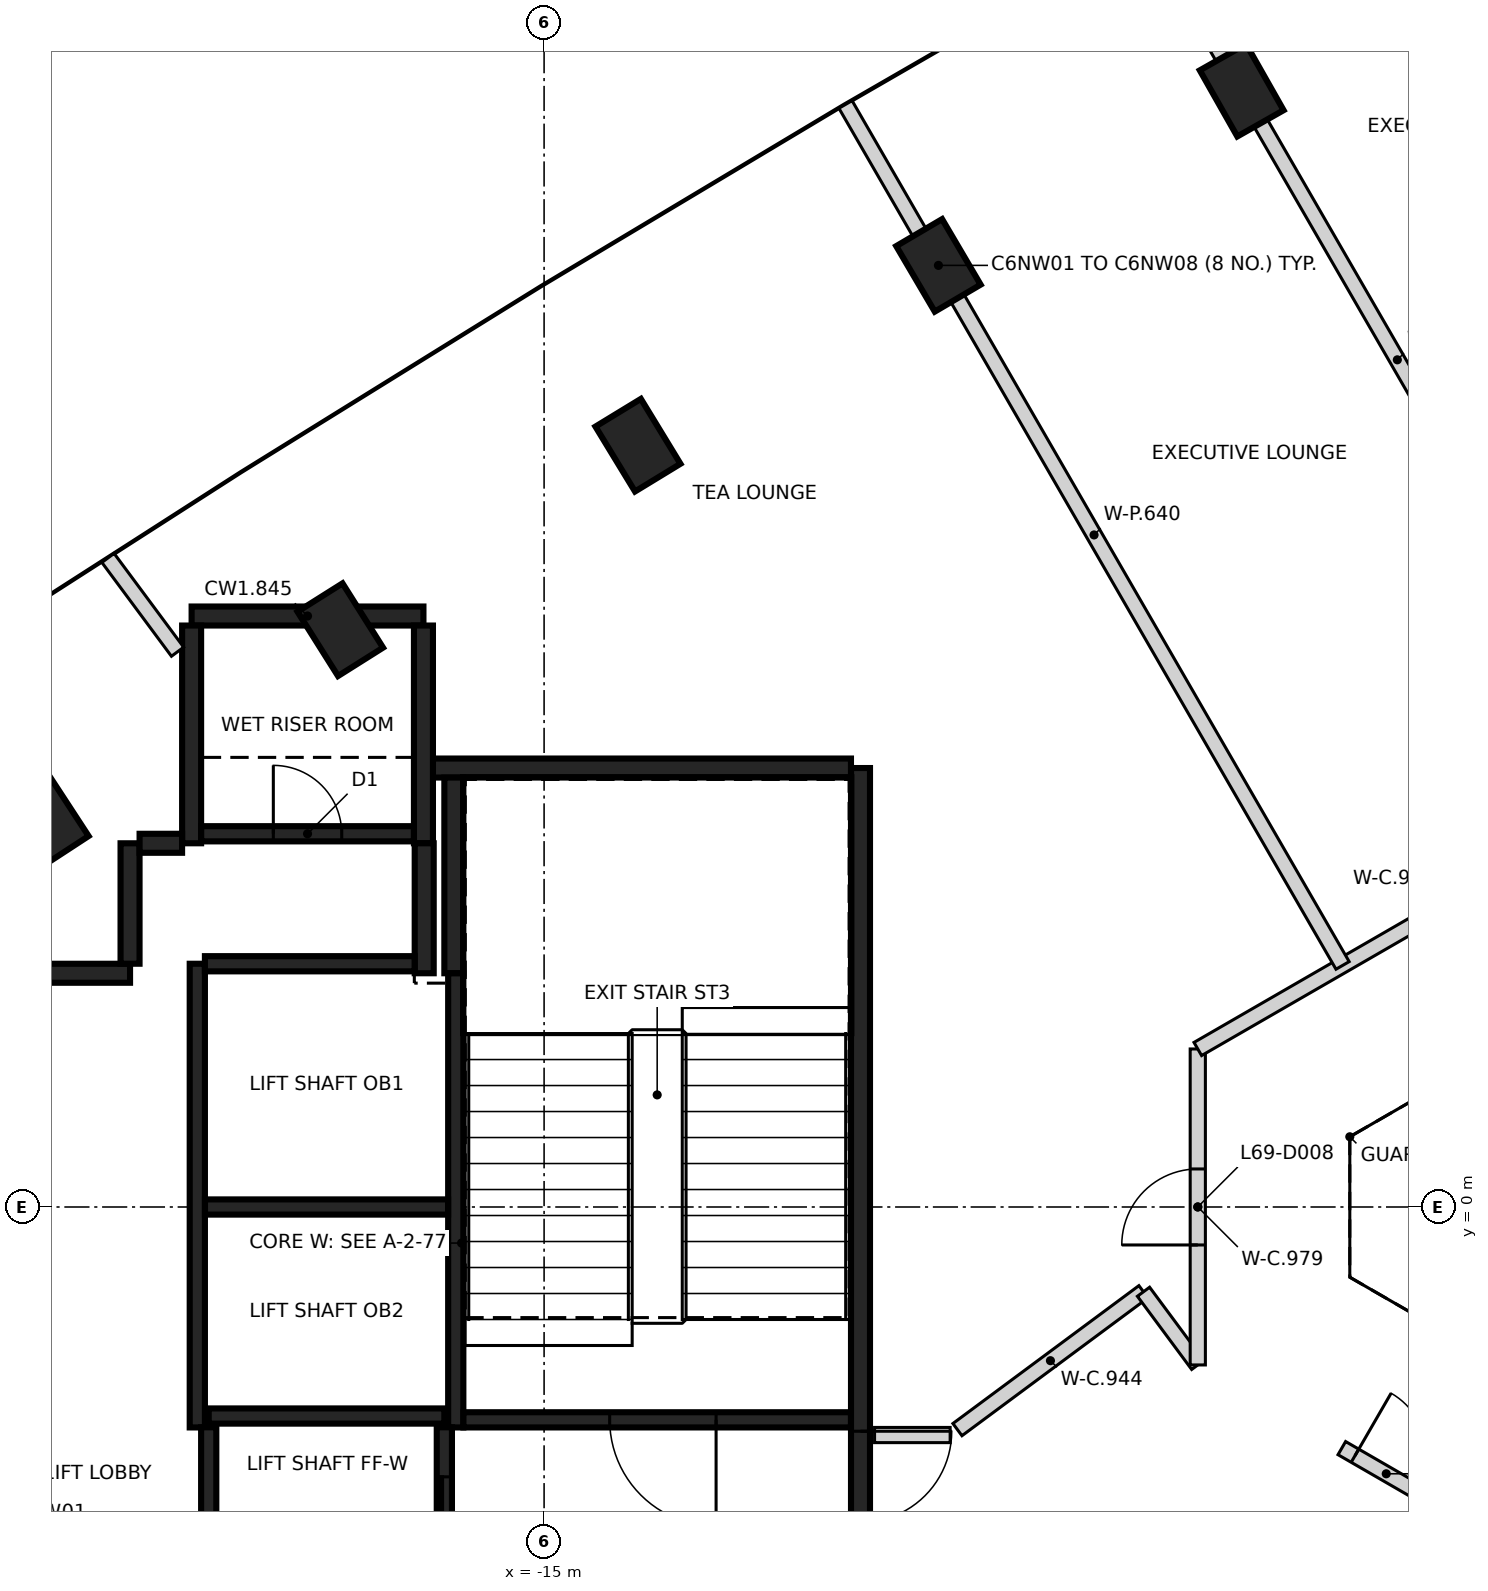
"""IFC4 building model, lengths in metres.
Left out: names, types, materials, properties, quantities, classifications, styles, units other than length and angle.
Written with IfcOpenShell. Run it as: python <this file> out.ifc"""

import sys

from ifc_helpers import new_model, si_unit, direction, frame, frame_2d, origin, origin_2d, place, context, subcontext, project, spatial, rectangle, extrude, element, fill, save


model = new_model("IFC4")
c1 = context("Model", 3, precision=1e-05, world=origin(), true_north=direction((0.0, 1.0)))
c2 = subcontext(c1, "Body", "Model", "MODEL_VIEW")
j1 = project(units=[si_unit("LENGTHUNIT", "METRE"), si_unit("PLANEANGLEUNIT", "RADIAN")], contexts=[c1])
p1 = place(None, origin())
s1 = spatial("IfcSite", under=j1, at=p1, CompositionType="ELEMENT")
p2 = place(p1, origin())
s2 = spatial("IfcBuilding", under=s1, at=p2, CompositionType="ELEMENT")
p3 = place(p2, frame((0.0, 0.0, 273.0)))
s3 = spatial("IfcBuildingStorey", under=s2, at=p3, CompositionType="ELEMENT", Elevation=273.0)
for number, where, z_axis, x_axis in (
    (1, (-5.822, 14.691, -0.35), (0.0, 0.0, 1.0), (-0.493, 0.87, 0.0)),
    (2, (-9.812, 12.388, -0.35), (0.0, 0.0, 1.0), (-0.507, 0.862, 0.0)),
    (3, (-13.765, 10.022, -0.35), (0.0, 0.0, 1.0), (-0.52, 0.854, 0.0)),
    (4, (-17.681, 7.595, -0.35), (0.0, 0.0, 1.0), (-0.533, 0.846, 0.0)),
    (5, (-21.559, 5.107, -0.35), (0.0, 0.0, 1.0), (-0.547, 0.837, 0.0)),
):
    element("IfcColumn", number, at=place(p3, frame(where, z_axis=z_axis, x_axis=x_axis)), inside=s3, PredefinedType="COLUMN", context=c2, shape_type="SweptSolid", body=[
        extrude(rectangle(XDim=1.0, YDim=0.7, at=origin_2d()), origin(), (0.0, 0.0, 1.0), 3.6),
    ])
p4 = place(p3, frame((-10.837, 5.775, 0.0), z_axis=(0.0, 0.0, 1.0), x_axis=(0.0, -1.0, 0.0)))
e6 = element("IfcWall", 6, at=p4, inside=s3, PredefinedType="SHEAR", context=c2, shape_type="SweptSolid", body=[
    extrude(rectangle(XDim=11.55, YDim=0.25, at=frame_2d((5.775, 0.0))), origin(), (0.0, 0.0, 1.0), 3.25),
])
p5 = place(p4, frame((10.025, 0.0, 0.0)))
e7 = element("IfcOpeningElement", 7, at=p5, cuts=e6, PredefinedType="OPENING", context=c2, shape_type="SweptSolid", body=[
    extrude(rectangle(XDim=1.2, YDim=2.1, at=frame_2d((0.6, 1.05))), frame((0.0, 0.135, 0.0), z_axis=(0.0, -1.0, 0.0), x_axis=(1.0, 0.0, 0.0)), (0.0, 0.0, 1.0), 0.27),
])
p6 = place(p4, frame((8.725, 0.0, 0.0)))
e8 = element("IfcOpeningElement", 8, at=p6, cuts=e6, PredefinedType="OPENING", context=c2, shape_type="SweptSolid", body=[
    extrude(rectangle(XDim=1.2, YDim=2.1, at=frame_2d((0.6, 1.05))), frame((0.0, 0.135, 0.0), z_axis=(0.0, -1.0, 0.0), x_axis=(1.0, 0.0, 0.0)), (0.0, 0.0, 1.0), 0.27),
])
p7 = place(p3, frame((-16.472, 5.775, 0.0), z_axis=(0.0, 0.0, 1.0), x_axis=(1.0, 0.0, 0.0)))
e9 = element("IfcWall", 9, at=p7, inside=s3, PredefinedType="SHEAR", context=c2, shape_type="SweptSolid", body=[
    extrude(rectangle(XDim=5.51, YDim=0.25, at=frame_2d((2.755, 0.0))), origin(), (0.0, 0.0, 1.0), 3.25),
])
p8 = place(p3, frame((-19.637, 7.775, 0.0), z_axis=(0.0, 0.0, 1.0), x_axis=(1.0, 0.0, 0.0)))
e10 = element("IfcWall", 10, at=p8, inside=s3, PredefinedType="SHEAR", context=c2, shape_type="SweptSolid", body=[
    extrude(rectangle(XDim=3.05, YDim=0.25, at=frame_2d((1.525, 0.0))), origin(), (0.0, 0.0, 1.0), 3.25),
])
for number, where, z_axis, x_axis in (
    (11, (-16.587, 7.65, 0.0), (0.0, 0.0, 1.0), (0.0, -1.0, 0.0)),
    (12, (-19.637, 4.785, 0.0), (0.0, 0.0, 1.0), (0.0, 1.0, 0.0)),
):
    element("IfcWall", number, at=place(p3, frame(where, z_axis=z_axis, x_axis=x_axis)), inside=s3, PredefinedType="SHEAR", context=c2, shape_type="SweptSolid", body=[
        extrude(rectangle(XDim=2.865, YDim=0.25, at=frame_2d((1.432, 0.0))), origin(), (0.0, 0.0, 1.0), 3.25),
    ])
p9 = place(p3, frame((-16.187, 3.075, 0.0), z_axis=(0.0, 0.0, 1.0), x_axis=(0.0, 1.0, 0.0)))
e13 = element("IfcWall", 13, at=p9, inside=s3, PredefinedType="SHEAR", context=c2, shape_type="SweptSolid", body=[
    extrude(rectangle(XDim=2.575, YDim=0.25, at=frame_2d((1.287, 0.0))), origin(), (0.0, 0.0, 1.0), 3.25),
])
p10 = place(p3, frame((-22.312, 3.075, 0.0), z_axis=(0.0, 0.0, 1.0), x_axis=(1.0, 0.0, 0.0)))
e14 = element("IfcWall", 14, at=p10, inside=s3, PredefinedType="SHEAR", context=c2, shape_type="SweptSolid", body=[
    extrude(rectangle(XDim=1.865, YDim=0.25, at=frame_2d((0.932, 0.0))), origin(), (0.0, 0.0, 1.0), 3.25),
])
p11 = place(p3, frame((-16.577, 4.785, 0.0), z_axis=(0.0, 0.0, 1.0), x_axis=(0.0, -1.0, 0.0)))
e15 = element("IfcWall", 15, at=p11, inside=s3, PredefinedType="SHEAR", context=c2, shape_type="SweptSolid", body=[
    extrude(rectangle(XDim=1.71, YDim=0.25, at=frame_2d((0.855, 0.0))), origin(), (0.0, 0.0, 1.0), 3.25),
])
p12 = place(p3, frame((-20.447, 3.2, 0.0), z_axis=(0.0, 0.0, 1.0), x_axis=(0.0, 1.0, 0.0)))
e16 = element("IfcWall", 16, at=p12, inside=s3, PredefinedType="SHEAR", context=c2, shape_type="SweptSolid", body=[
    extrude(rectangle(XDim=1.584, YDim=0.25, at=frame_2d((0.792, 0.0))), origin(), (0.0, 0.0, 1.0), 3.25),
])
p13 = place(p3, frame((-20.322, 4.785, 0.0), z_axis=(0.0, 0.0, 1.0), x_axis=(1.0, 0.0, 0.0)))
e17 = element("IfcWall", 17, at=p13, inside=s3, PredefinedType="SHEAR", context=c2, shape_type="SweptSolid", body=[
    extrude(rectangle(XDim=0.559, YDim=0.25, at=frame_2d((0.28, 0.0))), origin(), (0.0, 0.0, 1.0), 3.25),
])
p14 = place(p3, frame((-16.162, 3.074, 0.0), z_axis=(0.0, 0.0, 1.0), x_axis=(0.0, -1.0, 0.0)))
e18 = element("IfcWall", 18, at=p14, inside=s3, PredefinedType="SHEAR", context=c2, shape_type="SweptSolid", body=[
    extrude(rectangle(XDim=5.974, YDim=0.2, at=frame_2d((2.987, 0.0))), origin(), (0.0, 0.0, 1.0), 3.25),
])
p15 = place(p3, frame((-19.562, -2.9, 0.0), z_axis=(0.0, 0.0, 1.0), x_axis=(0.0, 1.0, 0.0)))
e19 = element("IfcWall", 19, at=p15, inside=s3, PredefinedType="SHEAR", context=c2, shape_type="SweptSolid", body=[
    extrude(rectangle(XDim=6.1, YDim=0.2, at=frame_2d((3.05, 0.0))), origin(), (0.0, 0.0, 1.0), 3.25),
])
p16 = place(p3, frame((-10.963, -2.8, 0.0), z_axis=(0.0, 0.0, 1.0), x_axis=(-1.0, 0.0, 0.0)))
e20 = element("IfcWall", 20, at=p16, inside=s3, PredefinedType="SHEAR", context=c2, shape_type="SweptSolid", body=[
    extrude(rectangle(XDim=5.098, YDim=0.2, at=frame_2d((2.549, 0.0))), origin(), (0.0, 0.0, 1.0), 3.25),
])
p17 = place(p16, frame((1.774, 0.0, 0.0)))
e21 = element("IfcOpeningElement", 21, at=p17, cuts=e20, PredefinedType="OPENING", context=c2, shape_type="SweptSolid", body=[
    extrude(rectangle(XDim=1.4, YDim=2.1, at=frame_2d((0.7, 1.05))), frame((0.0, 0.11, 0.0), z_axis=(0.0, -1.0, 0.0), x_axis=(1.0, 0.0, 0.0)), (0.0, 0.0, 1.0), 0.22),
])
p18 = place(p3, frame((-16.263, 0.0, 0.0), z_axis=(0.0, 0.0, 1.0), x_axis=(-1.0, 0.0, 0.0)))
e22 = element("IfcWall", 22, at=p18, inside=s3, PredefinedType="SHEAR", context=c2, shape_type="SweptSolid", body=[
    extrude(rectangle(XDim=3.198, YDim=0.2, at=frame_2d((1.599, 0.0))), origin(), (0.0, 0.0, 1.0), 3.25),
])
p19 = place(p3, frame((-19.511, 4.91, 0.0), z_axis=(0.0, 0.0, 1.0), x_axis=(1.0, 0.0, 0.0)))
e23 = element("IfcWall", 23, at=p19, inside=s3, PredefinedType="SHEAR", context=c2, shape_type="SweptSolid", body=[
    extrude(rectangle(XDim=2.798, YDim=0.2, at=frame_2d((1.399, 0.0))), origin(), (0.0, 0.0, 1.0), 3.25),
])
p20 = place(p19, frame((0.949, 0.0, 0.0)))
e24 = element("IfcOpeningElement", 24, at=p20, cuts=e23, PredefinedType="OPENING", context=c2, shape_type="SweptSolid", body=[
    extrude(rectangle(XDim=0.9, YDim=2.1, at=frame_2d((0.45, 1.05))), frame((0.0, 0.11, 0.0), z_axis=(0.0, -1.0, 0.0), x_axis=(1.0, 0.0, 0.0)), (0.0, 0.0, 1.0), 0.22),
])
p21 = place(p3, frame((-19.462, 3.2, 0.0), z_axis=(0.0, 0.0, 1.0), x_axis=(1.0, 0.0, 0.0)))
e25 = element("IfcWall", 25, at=p21, inside=s3, PredefinedType="SHEAR", context=c2, shape_type="SweptSolid", body=[
    extrude(rectangle(XDim=2.759, YDim=0.2, at=frame_2d((1.379, 0.0))), origin(), (0.0, 0.0, 1.0), 3.25),
])
p22 = place(p3, frame((-19.412, -2.75, 0.0), z_axis=(0.0, 0.0, 1.0), x_axis=(1.0, 0.0, 0.0)))
e26 = element("IfcWall", 26, at=p22, inside=s3, PredefinedType="SHEAR", context=c2, shape_type="SweptSolid", body=[
    extrude(rectangle(XDim=3.1, YDim=0.2, at=frame_2d((1.55, 0.0))), origin(), (0.0, 0.0, 1.0), 3.25),
])
p23 = place(p3, frame((-16.312, -2.898, 0.0), z_axis=(0.0, 0.0, 1.0), x_axis=(0.0, -1.0, 0.0)))
e27 = element("IfcWall", 27, at=p23, inside=s3, PredefinedType="SHEAR", context=c2, shape_type="SweptSolid", body=[
    extrude(rectangle(XDim=2.651, YDim=0.2, at=frame_2d((1.325, 0.0))), origin(), (0.0, 0.0, 1.0), 3.25),
])
p24 = place(p23, frame((0.652, 0.0, 0.0)))
e28 = element("IfcOpeningElement", 28, at=p24, cuts=e27, PredefinedType="OPENING", context=c2, shape_type="SweptSolid", body=[
    extrude(rectangle(XDim=1.3, YDim=2.1, at=frame_2d((0.65, 1.05))), frame((0.0, 0.11, 0.0), z_axis=(0.0, -1.0, 0.0), x_axis=(1.0, 0.0, 0.0)), (0.0, 0.0, 1.0), 0.22),
])
p25 = place(p3, frame((-19.412, -5.549, 0.0), z_axis=(0.0, 0.0, 1.0), x_axis=(0.0, 1.0, 0.0)))
e29 = element("IfcWall", 29, at=p25, inside=s3, PredefinedType="SHEAR", context=c2, shape_type="SweptSolid", body=[
    extrude(rectangle(XDim=2.651, YDim=0.2, at=frame_2d((1.325, 0.0))), origin(), (0.0, 0.0, 1.0), 3.25),
])
p26 = place(p3, frame((-10.652, -3.0, 0.0), z_axis=(0.0, 0.0, 1.0), x_axis=(1.0, 0.0, 0.0)))
e30 = element("IfcWall", 30, at=p26, inside=s3, PredefinedType="PARTITIONING", context=c2, shape_type="SweptSolid", body=[
    extrude(rectangle(XDim=0.994, YDim=0.2, at=frame_2d((0.497, 0.0))), origin(), (0.0, 0.0, 1.0), 3.25),
])
p27 = place(p3, frame((-7.115, -1.115, 0.0), z_axis=(0.0, 0.0, 1.0), x_axis=(-0.803344165632, -0.595515030495, 0.0)))
e31 = element("IfcWall", 31, at=p27, inside=s3, PredefinedType="PARTITIONING", context=c2, shape_type="SweptSolid", body=[
    extrude(rectangle(XDim=3.046, YDim=0.2, at=frame_2d((1.523, 0.0))), origin(), (0.0, 0.0, 1.0), 3.25),
])
p28 = place(p3, frame((-7.114, -1.115, 0.0), z_axis=(0.0, 0.0, 1.0), x_axis=(0.595690139668, -0.803214328496, 0.0)))
e32 = element("IfcWall", 32, at=p28, inside=s3, PredefinedType="PARTITIONING", context=c2, shape_type="SweptSolid", body=[
    extrude(rectangle(XDim=1.199, YDim=0.2, at=frame_2d((0.599, 0.0))), origin(), (0.0, 0.0, 1.0), 3.25),
])
p29 = place(p3, frame((-6.4, -2.078, 0.0), z_axis=(0.0, 0.0, 1.0), x_axis=(0.0, 1.0, 0.0)))
e33 = element("IfcWall", 33, at=p29, inside=s3, PredefinedType="PARTITIONING", context=c2, shape_type="SweptSolid", body=[
    extrude(rectangle(XDim=4.157, YDim=0.2, at=frame_2d((2.079, 0.0))), origin(), (0.0, 0.0, 1.0), 3.25),
])
p30 = place(p29, frame((1.579, 0.0, 0.0)))
e34 = element("IfcOpeningElement", 34, at=p30, cuts=e33, PredefinedType="OPENING", context=c2, shape_type="SweptSolid", body=[
    extrude(rectangle(XDim=1.0, YDim=2.1, at=frame_2d((0.5, 1.05))), frame((0.0, 0.11, 0.0), z_axis=(0.0, -1.0, 0.0), x_axis=(1.0, 0.0, 0.0)), (0.0, 0.0, 1.0), 0.22),
])
p31 = place(p3, frame((-6.4, 2.079, 0.0), z_axis=(0.0, 0.0, 1.0), x_axis=(0.866044821263, 0.499966366432, 0.0)))
e35 = element("IfcWall", 35, at=p31, inside=s3, PredefinedType="PARTITIONING", context=c2, shape_type="SweptSolid", body=[
    extrude(rectangle(XDim=8.953, YDim=0.2, at=frame_2d((4.477, 0.0))), origin(), (0.0, 0.0, 1.0), 3.25),
])
p32 = place(p31, frame((4.003, 0.0, 0.0)))
e36 = element("IfcOpeningElement", 36, at=p32, cuts=e35, PredefinedType="OPENING", context=c2, shape_type="SweptSolid", body=[
    extrude(rectangle(XDim=1.0, YDim=2.1, at=frame_2d((0.5, 1.05))), frame((0.0, 0.11, 0.0), z_axis=(0.0, -1.0, 0.0), x_axis=(1.0, 0.0, 0.0)), (0.0, 0.0, 1.0), 0.22),
])
p33 = place(p3, frame((-4.505, -3.172, 0.0), z_axis=(0.0, 0.0, 1.0), x_axis=(0.865815783666, -0.500362897061, 0.0)))
e37 = element("IfcWall", 37, at=p33, inside=s3, PredefinedType="PARTITIONING", context=c2, shape_type="SweptSolid", body=[
    extrude(rectangle(XDim=6.819, YDim=0.2, at=frame_2d((3.409, 0.0))), origin(), (0.0, 0.0, 1.0), 3.25),
])
p34 = place(p33, frame((0.2, 0.0, 0.0)))
e38 = element("IfcOpeningElement", 38, at=p34, cuts=e37, PredefinedType="OPENING", context=c2, shape_type="SweptSolid", body=[
    extrude(rectangle(XDim=0.95, YDim=2.1, at=frame_2d((0.475, 1.05))), frame((0.0, 0.11, 0.0), z_axis=(0.0, -1.0, 0.0), x_axis=(1.0, 0.0, 0.0)), (0.0, 0.0, 1.0), 0.22),
])
p35 = place(p3, frame((-20.738, 8.539, 0.0), z_axis=(0.0, 0.0, 1.0), x_axis=(0.595694844153, -0.803210839475, 0.0)))
e39 = element("IfcWall", 39, at=p35, inside=s3, PredefinedType="PARTITIONING", context=c2, shape_type="SweptSolid", body=[
    extrude(rectangle(XDim=1.536, YDim=0.2, at=frame_2d((0.768, 0.0))), origin(), (0.0, 0.0, 1.0), 3.25),
])
p36 = place(p3, frame((-11.035, 14.505, 0.0), z_axis=(0.0, 0.0, 1.0), x_axis=(0.499989597041, -0.866031409852, 0.0)))
e40 = element("IfcWall", 40, at=p36, inside=s3, PredefinedType="PARTITIONING", context=c2, shape_type="SweptSolid", body=[
    extrude(rectangle(XDim=13.079, YDim=0.2, at=frame_2d((6.54, 0.0))), origin(), (0.0, 0.0, 1.0), 3.25),
])
p37 = place(p3, frame((-7.044, 16.809, 0.0), z_axis=(0.0, 0.0, 1.0), x_axis=(0.499997679687, -0.866026743414, 0.0)))
e41 = element("IfcWall", 41, at=p37, inside=s3, PredefinedType="PARTITIONING", context=c2, shape_type="SweptSolid", body=[
    extrude(rectangle(XDim=13.079, YDim=0.2, at=frame_2d((6.54, 0.0))), origin(), (0.0, 0.0, 1.0), 3.25),
])
p38 = place(p3, frame((-4.303, -6.06, 0.0), z_axis=(0.0, 0.0, 1.0), x_axis=(0.500045362686, 0.865999212041, 0.0)))
e42 = element("IfcWall", 42, at=p38, inside=s3, PredefinedType="PARTITIONING", context=c2, shape_type="SweptSolid", body=[
    extrude(rectangle(XDim=2.4, YDim=0.15, at=frame_2d((1.2, 0.0))), origin(), (0.0, 0.0, 1.0), 3.25),
])
p39 = place(p38, frame((0.8, 0.0, 0.0)))
e43 = element("IfcOpeningElement", 43, at=p39, cuts=e42, PredefinedType="OPENING", context=c2, shape_type="SweptSolid", body=[
    extrude(rectangle(XDim=0.8, YDim=2.1, at=frame_2d((0.4, 1.05))), frame((0.0, 0.085, 0.0), z_axis=(0.0, -1.0, 0.0), x_axis=(1.0, 0.0, 0.0)), (0.0, 0.0, 1.0), 0.17),
])
p40 = place(p24, origin())
e44 = element("IfcDoor", 44, at=p40, inside=s3, OperationType="SLIDING_TO_RIGHT", PredefinedType="DOOR", context=c2, shape_type="SweptSolid", body=[
    extrude(rectangle(XDim=1.3, YDim=2.1, at=frame_2d((0.65, 1.05))), frame((0.0, 0.025, 0.0), z_axis=(0.0, -1.0, 0.0), x_axis=(1.0, 0.0, 0.0)), (0.0, 0.0, 1.0), 0.05),
])
fill(e28, e44)
p41 = place(p6, origin())
e45 = element("IfcDoor", 45, at=p41, inside=s3, OperationType="SINGLE_SWING_RIGHT", PredefinedType="DOOR", context=c2, shape_type="SweptSolid", body=[
    extrude(rectangle(XDim=1.2, YDim=2.1, at=frame_2d((0.6, 1.05))), frame((0.0, 0.025, 0.0), z_axis=(0.0, -1.0, 0.0), x_axis=(1.0, 0.0, 0.0)), (0.0, 0.0, 1.0), 0.05),
])
fill(e8, e45)
p42 = place(p17, origin())
e46 = element("IfcDoor", 46, at=p42, inside=s3, OperationType="SINGLE_SWING_RIGHT", PredefinedType="DOOR", context=c2, shape_type="SweptSolid", body=[
    extrude(rectangle(XDim=1.4, YDim=2.1, at=frame_2d((0.7, 1.05))), frame((0.0, 0.025, 0.0), z_axis=(0.0, -1.0, 0.0), x_axis=(1.0, 0.0, 0.0)), (0.0, 0.0, 1.0), 0.05),
])
fill(e21, e46)
p43 = place(p20, origin())
e47 = element("IfcDoor", 47, at=p43, inside=s3, OperationType="SINGLE_SWING_LEFT", PredefinedType="DOOR", context=c2, shape_type="SweptSolid", body=[
    extrude(rectangle(XDim=0.9, YDim=2.1, at=frame_2d((0.45, 1.05))), frame((0.0, 0.025, 0.0), z_axis=(0.0, -1.0, 0.0), x_axis=(1.0, 0.0, 0.0)), (0.0, 0.0, 1.0), 0.05),
])
fill(e24, e47)
p44 = place(p30, origin())
e48 = element("IfcDoor", 48, at=p44, inside=s3, OperationType="SINGLE_SWING_LEFT", PredefinedType="DOOR", context=c2, shape_type="SweptSolid", body=[
    extrude(rectangle(XDim=1.0, YDim=2.1, at=frame_2d((0.5, 1.05))), frame((0.0, 0.025, 0.0), z_axis=(0.0, -1.0, 0.0), x_axis=(1.0, 0.0, 0.0)), (0.0, 0.0, 1.0), 0.05),
])
fill(e34, e48)
p45 = place(p34, frame((0.95, 0.0, 0.0), z_axis=(0.0, 0.0, 1.0), x_axis=(-1.0, 0.0, 0.0)))
e49 = element("IfcDoor", 49, at=p45, inside=s3, OperationType="SINGLE_SWING_LEFT", PredefinedType="DOOR", context=c2, shape_type="SweptSolid", body=[
    extrude(rectangle(XDim=0.95, YDim=2.1, at=frame_2d((0.475, 1.05))), frame((0.0, 0.025, 0.0), z_axis=(0.0, -1.0, 0.0), x_axis=(1.0, 0.0, 0.0)), (0.0, 0.0, 1.0), 0.05),
])
fill(e38, e49)
save(model, sys.argv[1])
